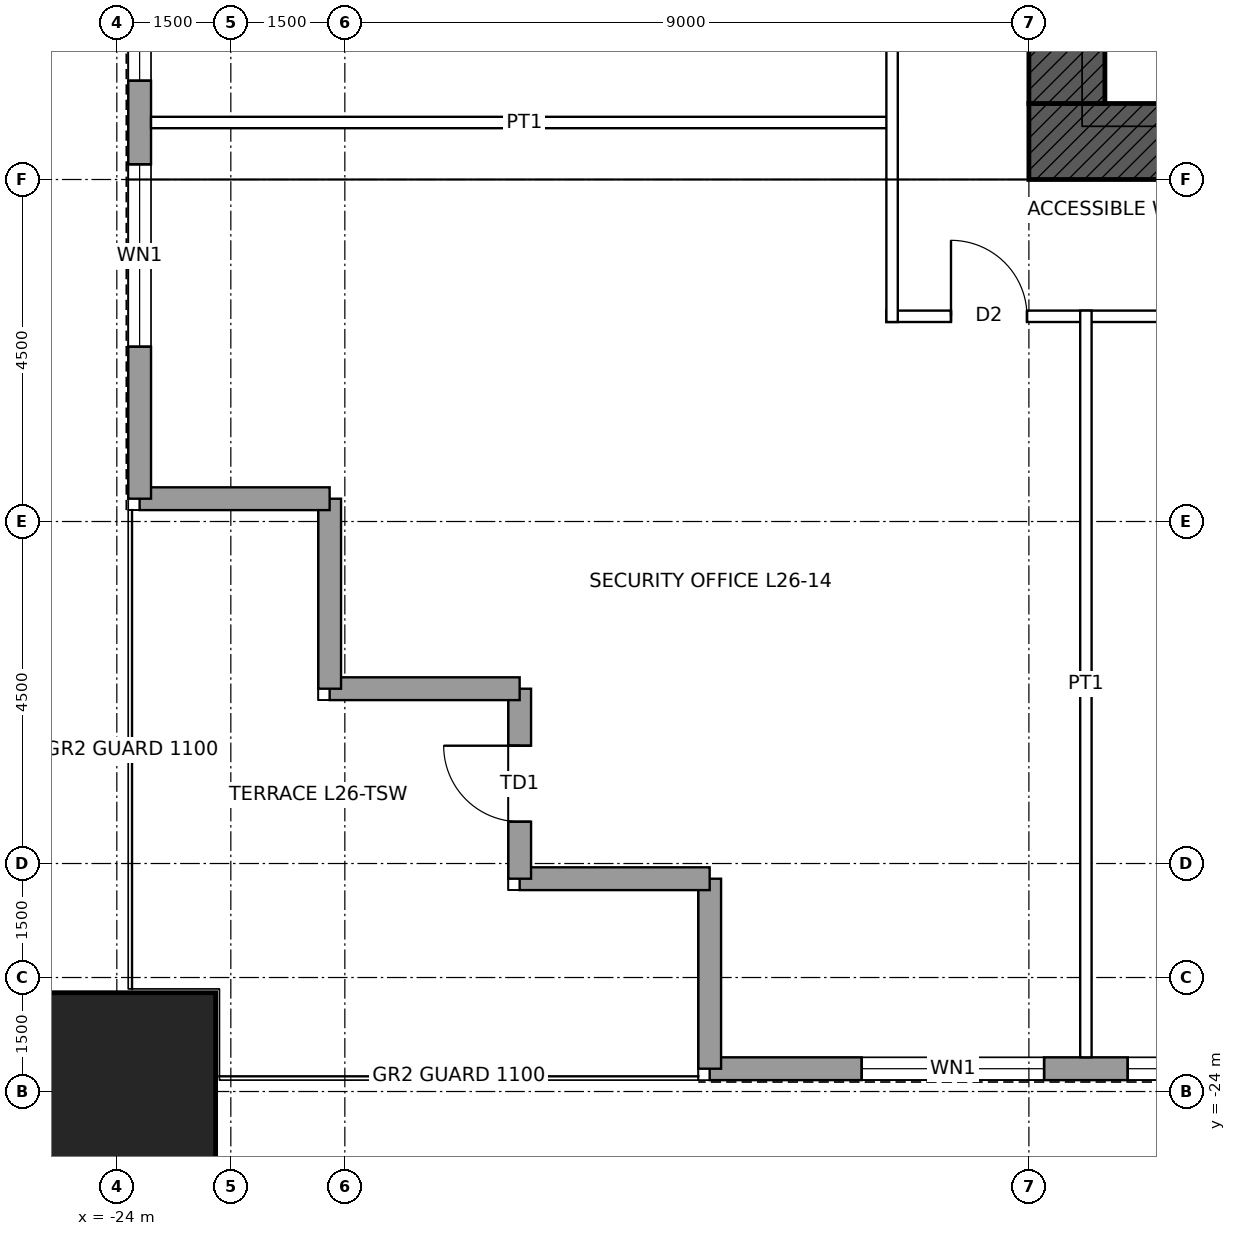
"""IFC4 building model, lengths in metres.
Left out: names, types, materials, properties, quantities, classifications, styles, units other than length and angle.
Written with IfcOpenShell. Run it as: python <this file> out.ifc"""

import sys

from ifc_helpers import new_model, si_unit, direction, frame, frame_2d, origin, origin_2d, place, context, subcontext, project, spatial, rectangle, hollow_rectangle, extrude, element, fill, save


model = new_model("IFC4")
c1 = context("Model", 3, precision=1e-05, world=origin(), true_north=direction((0.0, 1.0)))
c2 = subcontext(c1, "Body", "Model", "MODEL_VIEW")
j1 = project(units=[si_unit("LENGTHUNIT", "METRE"), si_unit("PLANEANGLEUNIT", "RADIAN")], contexts=[c1])
p1 = place(None, origin())
s1 = spatial("IfcSite", under=j1, at=p1, CompositionType="ELEMENT")
p2 = place(p1, origin())
s2 = spatial("IfcBuilding", under=s1, at=p2, CompositionType="ELEMENT")
p3 = place(p2, frame((0.0, 0.0, 131.4)))
s3 = spatial("IfcBuildingStorey", under=s2, at=p3, CompositionType="ELEMENT", Elevation=131.4)
p4 = place(p3, frame((-24.0, -24.0, 0.0), z_axis=(0.0, 0.0, 1.0), x_axis=(1.0, 0.0, 0.0)))
e1 = element("IfcColumn", 1, at=p4, inside=s3, PredefinedType="COLUMN", context=c2, shape_type="SweptSolid", body=[
    extrude(hollow_rectangle(XDim=2.6, YDim=2.6, WallThickness=0.13, at=origin_2d()), origin(), (0.0, 0.0, 1.0), 4.5),
])
p5 = place(p3, frame((12.0, -11.5, 0.0), z_axis=(0.0, 0.0, 1.0), x_axis=(-1.0, 0.0, 0.0)))
e2 = element("IfcWall", 2, at=p5, inside=s3, PredefinedType="SHEAR", context=c2, shape_type="SweptSolid", body=[
    extrude(rectangle(XDim=24.0, YDim=1.0, at=frame_2d((12.0, 0.0))), origin(), (0.0, 0.0, 1.0), 4.5),
])
p6 = place(p5, frame((11.5, 0.0, 0.0)))
e3 = element("IfcOpeningElement", 3, at=p6, cuts=e2, PredefinedType="OPENING", context=c2, shape_type="SweptSolid", body=[
    extrude(rectangle(XDim=1.0, YDim=2.1, at=frame_2d((0.5, 1.05))), frame((0.0, 0.51, 0.0), z_axis=(0.0, -1.0, 0.0), x_axis=(1.0, 0.0, 0.0)), (0.0, 0.0, 1.0), 1.02),
])
p7 = place(p5, frame((1.0, 0.0, 0.0)))
e4 = element("IfcOpeningElement", 4, at=p7, cuts=e2, PredefinedType="OPENING", context=c2, shape_type="SweptSolid", body=[
    extrude(rectangle(XDim=1.0, YDim=2.4, at=frame_2d((0.5, 1.2))), frame((0.0, 0.51, 0.0), z_axis=(0.0, -1.0, 0.0), x_axis=(1.0, 0.0, 0.0)), (0.0, 0.0, 1.0), 1.02),
])
p8 = place(p3, frame((-11.5, -11.0, 0.0), z_axis=(0.0, 0.0, 1.0), x_axis=(0.0, 1.0, 0.0)))
e5 = element("IfcWall", 5, at=p8, inside=s3, PredefinedType="SHEAR", context=c2, shape_type="SweptSolid", body=[
    extrude(rectangle(XDim=22.0, YDim=1.0, at=frame_2d((11.0, 0.0))), origin(), (0.0, 0.0, 1.0), 4.5),
])
p9 = place(p8, frame((10.5, 0.0, 0.0)))
e6 = element("IfcOpeningElement", 6, at=p9, cuts=e5, PredefinedType="OPENING", context=c2, shape_type="SweptSolid", body=[
    extrude(rectangle(XDim=1.0, YDim=2.4, at=frame_2d((0.5, 1.2))), frame((0.0, 0.51, 0.0), z_axis=(0.0, -1.0, 0.0), x_axis=(1.0, 0.0, 0.0)), (0.0, 0.0, 1.0), 1.02),
])
p10 = place(p3, frame((16.2, -23.7, 0.0), z_axis=(0.0, 0.0, 1.0), x_axis=(-1.0, 0.0, 0.0)))
e7 = element("IfcWall", 7, at=p10, inside=s3, PredefinedType="SOLIDWALL", context=c2, shape_type="SweptSolid", body=[
    extrude(rectangle(XDim=32.4, YDim=0.3, at=frame_2d((16.2, 0.0))), origin(), (0.0, 0.0, 1.0), 4.3),
])
p11 = place(p10, frame((2.0, 0.0, 1.0)))
e8 = element("IfcOpeningElement", 8, at=p11, cuts=e7, PredefinedType="OPENING", context=c2, shape_type="SweptSolid", body=[
    extrude(rectangle(XDim=2.4, YDim=1.2, at=frame_2d((1.2, 0.6))), frame((0.0, 0.16, 0.0), z_axis=(0.0, -1.0, 0.0), x_axis=(1.0, 0.0, 0.0)), (0.0, 0.0, 1.0), 0.32),
])
p12 = place(p10, frame((5.5, 0.0, 1.0)))
e9 = element("IfcOpeningElement", 9, at=p12, cuts=e7, PredefinedType="OPENING", context=c2, shape_type="SweptSolid", body=[
    extrude(rectangle(XDim=2.4, YDim=1.2, at=frame_2d((1.2, 0.6))), frame((0.0, 0.16, 0.0), z_axis=(0.0, -1.0, 0.0), x_axis=(1.0, 0.0, 0.0)), (0.0, 0.0, 1.0), 0.32),
])
p13 = place(p10, frame((9.5, 0.0, 1.0)))
e10 = element("IfcOpeningElement", 10, at=p13, cuts=e7, PredefinedType="OPENING", context=c2, shape_type="SweptSolid", body=[
    extrude(rectangle(XDim=2.4, YDim=1.2, at=frame_2d((1.2, 0.6))), frame((0.0, 0.16, 0.0), z_axis=(0.0, -1.0, 0.0), x_axis=(1.0, 0.0, 0.0)), (0.0, 0.0, 1.0), 0.32),
])
p14 = place(p10, frame((13.0, 0.0, 1.0)))
e11 = element("IfcOpeningElement", 11, at=p14, cuts=e7, PredefinedType="OPENING", context=c2, shape_type="SweptSolid", body=[
    extrude(rectangle(XDim=2.4, YDim=1.2, at=frame_2d((1.2, 0.6))), frame((0.0, 0.16, 0.0), z_axis=(0.0, -1.0, 0.0), x_axis=(1.0, 0.0, 0.0)), (0.0, 0.0, 1.0), 0.32),
])
p15 = place(p10, frame((17.0, 0.0, 1.0)))
e12 = element("IfcOpeningElement", 12, at=p15, cuts=e7, PredefinedType="OPENING", context=c2, shape_type="SweptSolid", body=[
    extrude(rectangle(XDim=2.4, YDim=1.2, at=frame_2d((1.2, 0.6))), frame((0.0, 0.16, 0.0), z_axis=(0.0, -1.0, 0.0), x_axis=(1.0, 0.0, 0.0)), (0.0, 0.0, 1.0), 0.32),
])
p16 = place(p10, frame((20.5, 0.0, 1.0)))
e13 = element("IfcOpeningElement", 13, at=p16, cuts=e7, PredefinedType="OPENING", context=c2, shape_type="SweptSolid", body=[
    extrude(rectangle(XDim=2.4, YDim=1.2, at=frame_2d((1.2, 0.6))), frame((0.0, 0.16, 0.0), z_axis=(0.0, -1.0, 0.0), x_axis=(1.0, 0.0, 0.0)), (0.0, 0.0, 1.0), 0.32),
])
p17 = place(p10, frame((24.5, 0.0, 1.0)))
e14 = element("IfcOpeningElement", 14, at=p17, cuts=e7, PredefinedType="OPENING", context=c2, shape_type="SweptSolid", body=[
    extrude(rectangle(XDim=2.4, YDim=1.2, at=frame_2d((1.2, 0.6))), frame((0.0, 0.16, 0.0), z_axis=(0.0, -1.0, 0.0), x_axis=(1.0, 0.0, 0.0)), (0.0, 0.0, 1.0), 0.32),
])
p18 = place(p10, frame((28.0, 0.0, 1.0)))
e15 = element("IfcOpeningElement", 15, at=p18, cuts=e7, PredefinedType="OPENING", context=c2, shape_type="SweptSolid", body=[
    extrude(rectangle(XDim=2.4, YDim=1.2, at=frame_2d((1.2, 0.6))), frame((0.0, 0.16, 0.0), z_axis=(0.0, -1.0, 0.0), x_axis=(1.0, 0.0, 0.0)), (0.0, 0.0, 1.0), 0.32),
])
for number, where, z_axis, x_axis in (
    (16, (-16.2, -23.7, 0.0), (0.0, 0.0, 1.0), (0.0, 1.0, 0.0)),
    (17, (-16.2, -21.2, 0.0), (0.0, 0.0, 1.0), (-1.0, 0.0, 0.0)),
):
    element("IfcWall", number, at=place(p3, frame(where, z_axis=z_axis, x_axis=x_axis)), inside=s3, PredefinedType="SOLIDWALL", context=c2, shape_type="SweptSolid", body=[
        extrude(rectangle(XDim=2.5, YDim=0.3, at=frame_2d((1.25, 0.0))), origin(), (0.0, 0.0, 1.0), 4.3),
    ])
p19 = place(p3, frame((-18.7, -21.2, 0.0), z_axis=(0.0, 0.0, 1.0), x_axis=(0.0, 1.0, 0.0)))
e18 = element("IfcWall", 18, at=p19, inside=s3, PredefinedType="SOLIDWALL", context=c2, shape_type="SweptSolid", body=[
    extrude(rectangle(XDim=2.5, YDim=0.3, at=frame_2d((1.25, 0.0))), origin(), (0.0, 0.0, 1.0), 4.3),
])
p20 = place(p19, frame((0.75, 0.0, 0.0)))
e19 = element("IfcOpeningElement", 19, at=p20, cuts=e18, PredefinedType="OPENING", context=c2, shape_type="SweptSolid", body=[
    extrude(rectangle(XDim=1.0, YDim=2.4, at=frame_2d((0.5, 1.2))), frame((0.0, 0.16, 0.0), z_axis=(0.0, -1.0, 0.0), x_axis=(1.0, 0.0, 0.0)), (0.0, 0.0, 1.0), 0.32),
])
for number, where, z_axis, x_axis in (
    (20, (-18.7, -18.7, 0.0), (0.0, 0.0, 1.0), (-1.0, 0.0, 0.0)),
    (21, (-21.2, -18.7, 0.0), (0.0, 0.0, 1.0), (0.0, 1.0, 0.0)),
    (22, (-21.2, -16.2, 0.0), (0.0, 0.0, 1.0), (-1.0, 0.0, 0.0)),
):
    element("IfcWall", number, at=place(p3, frame(where, z_axis=z_axis, x_axis=x_axis)), inside=s3, PredefinedType="SOLIDWALL", context=c2, shape_type="SweptSolid", body=[
        extrude(rectangle(XDim=2.5, YDim=0.3, at=frame_2d((1.25, 0.0))), origin(), (0.0, 0.0, 1.0), 4.3),
    ])
p21 = place(p3, frame((-23.7, -16.2, 0.0), z_axis=(0.0, 0.0, 1.0), x_axis=(0.0, 1.0, 0.0)))
e23 = element("IfcWall", 23, at=p21, inside=s3, PredefinedType="SOLIDWALL", context=c2, shape_type="SweptSolid", body=[
    extrude(rectangle(XDim=32.4, YDim=0.3, at=frame_2d((16.2, 0.0))), origin(), (0.0, 0.0, 1.0), 4.3),
])
p22 = place(p21, frame((2.0, 0.0, 1.0)))
e24 = element("IfcOpeningElement", 24, at=p22, cuts=e23, PredefinedType="OPENING", context=c2, shape_type="SweptSolid", body=[
    extrude(rectangle(XDim=2.4, YDim=1.2, at=frame_2d((1.2, 0.6))), frame((0.0, 0.16, 0.0), z_axis=(0.0, -1.0, 0.0), x_axis=(1.0, 0.0, 0.0)), (0.0, 0.0, 1.0), 0.32),
])
p23 = place(p21, frame((5.5, 0.0, 1.0)))
e25 = element("IfcOpeningElement", 25, at=p23, cuts=e23, PredefinedType="OPENING", context=c2, shape_type="SweptSolid", body=[
    extrude(rectangle(XDim=2.4, YDim=1.2, at=frame_2d((1.2, 0.6))), frame((0.0, 0.16, 0.0), z_axis=(0.0, -1.0, 0.0), x_axis=(1.0, 0.0, 0.0)), (0.0, 0.0, 1.0), 0.32),
])
p24 = place(p21, frame((9.5, 0.0, 1.0)))
e26 = element("IfcOpeningElement", 26, at=p24, cuts=e23, PredefinedType="OPENING", context=c2, shape_type="SweptSolid", body=[
    extrude(rectangle(XDim=2.4, YDim=1.2, at=frame_2d((1.2, 0.6))), frame((0.0, 0.16, 0.0), z_axis=(0.0, -1.0, 0.0), x_axis=(1.0, 0.0, 0.0)), (0.0, 0.0, 1.0), 0.32),
])
p25 = place(p21, frame((13.0, 0.0, 1.0)))
e27 = element("IfcOpeningElement", 27, at=p25, cuts=e23, PredefinedType="OPENING", context=c2, shape_type="SweptSolid", body=[
    extrude(rectangle(XDim=2.4, YDim=1.2, at=frame_2d((1.2, 0.6))), frame((0.0, 0.16, 0.0), z_axis=(0.0, -1.0, 0.0), x_axis=(1.0, 0.0, 0.0)), (0.0, 0.0, 1.0), 0.32),
])
p26 = place(p21, frame((17.0, 0.0, 1.0)))
e28 = element("IfcOpeningElement", 28, at=p26, cuts=e23, PredefinedType="OPENING", context=c2, shape_type="SweptSolid", body=[
    extrude(rectangle(XDim=2.4, YDim=1.2, at=frame_2d((1.2, 0.6))), frame((0.0, 0.16, 0.0), z_axis=(0.0, -1.0, 0.0), x_axis=(1.0, 0.0, 0.0)), (0.0, 0.0, 1.0), 0.32),
])
p27 = place(p21, frame((20.5, 0.0, 1.0)))
e29 = element("IfcOpeningElement", 29, at=p27, cuts=e23, PredefinedType="OPENING", context=c2, shape_type="SweptSolid", body=[
    extrude(rectangle(XDim=2.4, YDim=1.2, at=frame_2d((1.2, 0.6))), frame((0.0, 0.16, 0.0), z_axis=(0.0, -1.0, 0.0), x_axis=(1.0, 0.0, 0.0)), (0.0, 0.0, 1.0), 0.32),
])
p28 = place(p21, frame((24.5, 0.0, 1.0)))
e30 = element("IfcOpeningElement", 30, at=p28, cuts=e23, PredefinedType="OPENING", context=c2, shape_type="SweptSolid", body=[
    extrude(rectangle(XDim=2.4, YDim=1.2, at=frame_2d((1.2, 0.6))), frame((0.0, 0.16, 0.0), z_axis=(0.0, -1.0, 0.0), x_axis=(1.0, 0.0, 0.0)), (0.0, 0.0, 1.0), 0.32),
])
p29 = place(p21, frame((28.0, 0.0, 1.0)))
e31 = element("IfcOpeningElement", 31, at=p29, cuts=e23, PredefinedType="OPENING", context=c2, shape_type="SweptSolid", body=[
    extrude(rectangle(XDim=2.4, YDim=1.2, at=frame_2d((1.2, 0.6))), frame((0.0, 0.16, 0.0), z_axis=(0.0, -1.0, 0.0), x_axis=(1.0, 0.0, 0.0)), (0.0, 0.0, 1.0), 0.32),
])
p30 = place(p3, frame((-13.875, -13.8, 0.0), z_axis=(0.0, 0.0, 1.0), x_axis=(1.0, 0.0, 0.0)))
e32 = element("IfcWall", 32, at=p30, inside=s3, PredefinedType="PARTITIONING", context=c2, shape_type="SweptSolid", body=[
    extrude(rectangle(XDim=27.75, YDim=0.15, at=frame_2d((13.875, 0.0))), origin(), (0.0, 0.0, 1.0), 4.3),
])
p31 = place(p30, frame((20.475, 0.0, 0.0)))
e33 = element("IfcOpeningElement", 33, at=p31, cuts=e32, PredefinedType="OPENING", context=c2, shape_type="SweptSolid", body=[
    extrude(rectangle(XDim=1.8, YDim=2.4, at=frame_2d((0.9, 1.2))), frame((0.0, 0.085, 0.0), z_axis=(0.0, -1.0, 0.0), x_axis=(1.0, 0.0, 0.0)), (0.0, 0.0, 1.0), 0.17),
])
p32 = place(p30, frame((10.525, 0.0, 0.0)))
e34 = element("IfcOpeningElement", 34, at=p32, cuts=e32, PredefinedType="OPENING", context=c2, shape_type="SweptSolid", body=[
    extrude(rectangle(XDim=1.8, YDim=2.4, at=frame_2d((0.9, 1.2))), frame((0.0, 0.085, 0.0), z_axis=(0.0, -1.0, 0.0), x_axis=(1.0, 0.0, 0.0)), (0.0, 0.0, 1.0), 0.17),
])
p33 = place(p30, frame((5.475, 0.0, 0.0)))
e35 = element("IfcOpeningElement", 35, at=p33, cuts=e32, PredefinedType="OPENING", context=c2, shape_type="SweptSolid", body=[
    extrude(rectangle(XDim=1.8, YDim=2.4, at=frame_2d((0.9, 1.2))), frame((0.0, 0.085, 0.0), z_axis=(0.0, -1.0, 0.0), x_axis=(1.0, 0.0, 0.0)), (0.0, 0.0, 1.0), 0.17),
])
p34 = place(p30, frame((25.9, 0.0, 0.0)))
e36 = element("IfcOpeningElement", 36, at=p34, cuts=e32, PredefinedType="OPENING", context=c2, shape_type="SweptSolid", body=[
    extrude(rectangle(XDim=1.0, YDim=2.1, at=frame_2d((0.5, 1.05))), frame((0.0, 0.085, 0.0), z_axis=(0.0, -1.0, 0.0), x_axis=(1.0, 0.0, 0.0)), (0.0, 0.0, 1.0), 0.17),
])
p35 = place(p30, frame((0.85, 0.0, 0.0)))
e37 = element("IfcOpeningElement", 37, at=p35, cuts=e32, PredefinedType="OPENING", context=c2, shape_type="SweptSolid", body=[
    extrude(rectangle(XDim=1.0, YDim=2.1, at=frame_2d((0.5, 1.05))), frame((0.0, 0.085, 0.0), z_axis=(0.0, -1.0, 0.0), x_axis=(1.0, 0.0, 0.0)), (0.0, 0.0, 1.0), 0.17),
])
p36 = place(p3, frame((-23.55, -11.25, 0.0), z_axis=(0.0, 0.0, 1.0), x_axis=(1.0, 0.0, 0.0)))
e38 = element("IfcWall", 38, at=p36, inside=s3, PredefinedType="PARTITIONING", context=c2, shape_type="SweptSolid", body=[
    extrude(rectangle(XDim=9.825, YDim=0.15, at=frame_2d((4.913, 0.0))), origin(), (0.0, 0.0, 1.0), 3.431),
])
p37 = place(p3, frame((-13.8, -13.875, 0.0), z_axis=(0.0, 0.0, 1.0), x_axis=(0.0, 1.0, 0.0)))
e39 = element("IfcWall", 39, at=p37, inside=s3, PredefinedType="PARTITIONING", context=c2, shape_type="SweptSolid", body=[
    extrude(rectangle(XDim=27.75, YDim=0.15, at=frame_2d((13.875, 0.0))), origin(), (0.0, 0.0, 1.0), 4.3),
])
p38 = place(p37, frame((7.75, 0.0, 0.0)))
e40 = element("IfcOpeningElement", 40, at=p38, cuts=e39, PredefinedType="OPENING", context=c2, shape_type="SweptSolid", body=[
    extrude(rectangle(XDim=1.0, YDim=2.1, at=frame_2d((0.5, 1.05))), frame((0.0, 0.085, 0.0), z_axis=(0.0, -1.0, 0.0), x_axis=(1.0, 0.0, 0.0)), (0.0, 0.0, 1.0), 0.17),
])
p39 = place(p37, frame((18.6, 0.0, 0.0)))
e41 = element("IfcOpeningElement", 41, at=p39, cuts=e39, PredefinedType="OPENING", context=c2, shape_type="SweptSolid", body=[
    extrude(rectangle(XDim=1.8, YDim=2.4, at=frame_2d((0.9, 1.2))), frame((0.0, 0.085, 0.0), z_axis=(0.0, -1.0, 0.0), x_axis=(1.0, 0.0, 0.0)), (0.0, 0.0, 1.0), 0.17),
])
p40 = place(p3, frame((-11.25, -23.55, 0.0), z_axis=(0.0, 0.0, 1.0), x_axis=(0.0, 1.0, 0.0)))
e42 = element("IfcWall", 42, at=p40, inside=s3, PredefinedType="PARTITIONING", context=c2, shape_type="SweptSolid", body=[
    extrude(rectangle(XDim=9.825, YDim=0.15, at=frame_2d((4.913, 0.0))), origin(), (0.0, 0.0, 1.0), 3.431),
])
p41 = place(p17, origin())
e43 = element("IfcWindow", 43, at=p41, inside=s3, PartitioningType="SINGLE_PANEL", PredefinedType="WINDOW", context=c2, shape_type="SweptSolid", body=[
    extrude(rectangle(XDim=2.4, YDim=1.2, at=frame_2d((1.2, 0.6))), frame((0.0, 0.03, 0.0), z_axis=(0.0, -1.0, 0.0), x_axis=(1.0, 0.0, 0.0)), (0.0, 0.0, 1.0), 0.06),
])
fill(e14, e43)
p42 = place(p18, origin())
e44 = element("IfcWindow", 44, at=p42, inside=s3, PartitioningType="SINGLE_PANEL", PredefinedType="WINDOW", context=c2, shape_type="SweptSolid", body=[
    extrude(rectangle(XDim=2.4, YDim=1.2, at=frame_2d((1.2, 0.6))), frame((0.0, 0.03, 0.0), z_axis=(0.0, -1.0, 0.0), x_axis=(1.0, 0.0, 0.0)), (0.0, 0.0, 1.0), 0.06),
])
fill(e15, e44)
p43 = place(p20, origin())
e45 = element("IfcDoor", 45, at=p43, inside=s3, OperationType="SINGLE_SWING_RIGHT", PredefinedType="DOOR", context=c2, shape_type="SweptSolid", body=[
    extrude(rectangle(XDim=1.0, YDim=2.4, at=frame_2d((0.5, 1.2))), frame((0.0, 0.025, 0.0), z_axis=(0.0, -1.0, 0.0), x_axis=(1.0, 0.0, 0.0)), (0.0, 0.0, 1.0), 0.05),
])
fill(e19, e45)
p44 = place(p22, origin())
e46 = element("IfcWindow", 46, at=p44, inside=s3, PartitioningType="SINGLE_PANEL", PredefinedType="WINDOW", context=c2, shape_type="SweptSolid", body=[
    extrude(rectangle(XDim=2.4, YDim=1.2, at=frame_2d((1.2, 0.6))), frame((0.0, 0.03, 0.0), z_axis=(0.0, -1.0, 0.0), x_axis=(1.0, 0.0, 0.0)), (0.0, 0.0, 1.0), 0.06),
])
fill(e24, e46)
p45 = place(p23, origin())
e47 = element("IfcWindow", 47, at=p45, inside=s3, PartitioningType="SINGLE_PANEL", PredefinedType="WINDOW", context=c2, shape_type="SweptSolid", body=[
    extrude(rectangle(XDim=2.4, YDim=1.2, at=frame_2d((1.2, 0.6))), frame((0.0, 0.03, 0.0), z_axis=(0.0, -1.0, 0.0), x_axis=(1.0, 0.0, 0.0)), (0.0, 0.0, 1.0), 0.06),
])
fill(e25, e47)
p46 = place(p35, origin())
e48 = element("IfcDoor", 48, at=p46, inside=s3, OperationType="SINGLE_SWING_LEFT", PredefinedType="DOOR", context=c2, shape_type="SweptSolid", body=[
    extrude(rectangle(XDim=1.0, YDim=2.1, at=frame_2d((0.5, 1.05))), frame((0.0, 0.025, 0.0), z_axis=(0.0, -1.0, 0.0), x_axis=(1.0, 0.0, 0.0)), (0.0, 0.0, 1.0), 0.05),
])
fill(e37, e48)
save(model, sys.argv[1])
